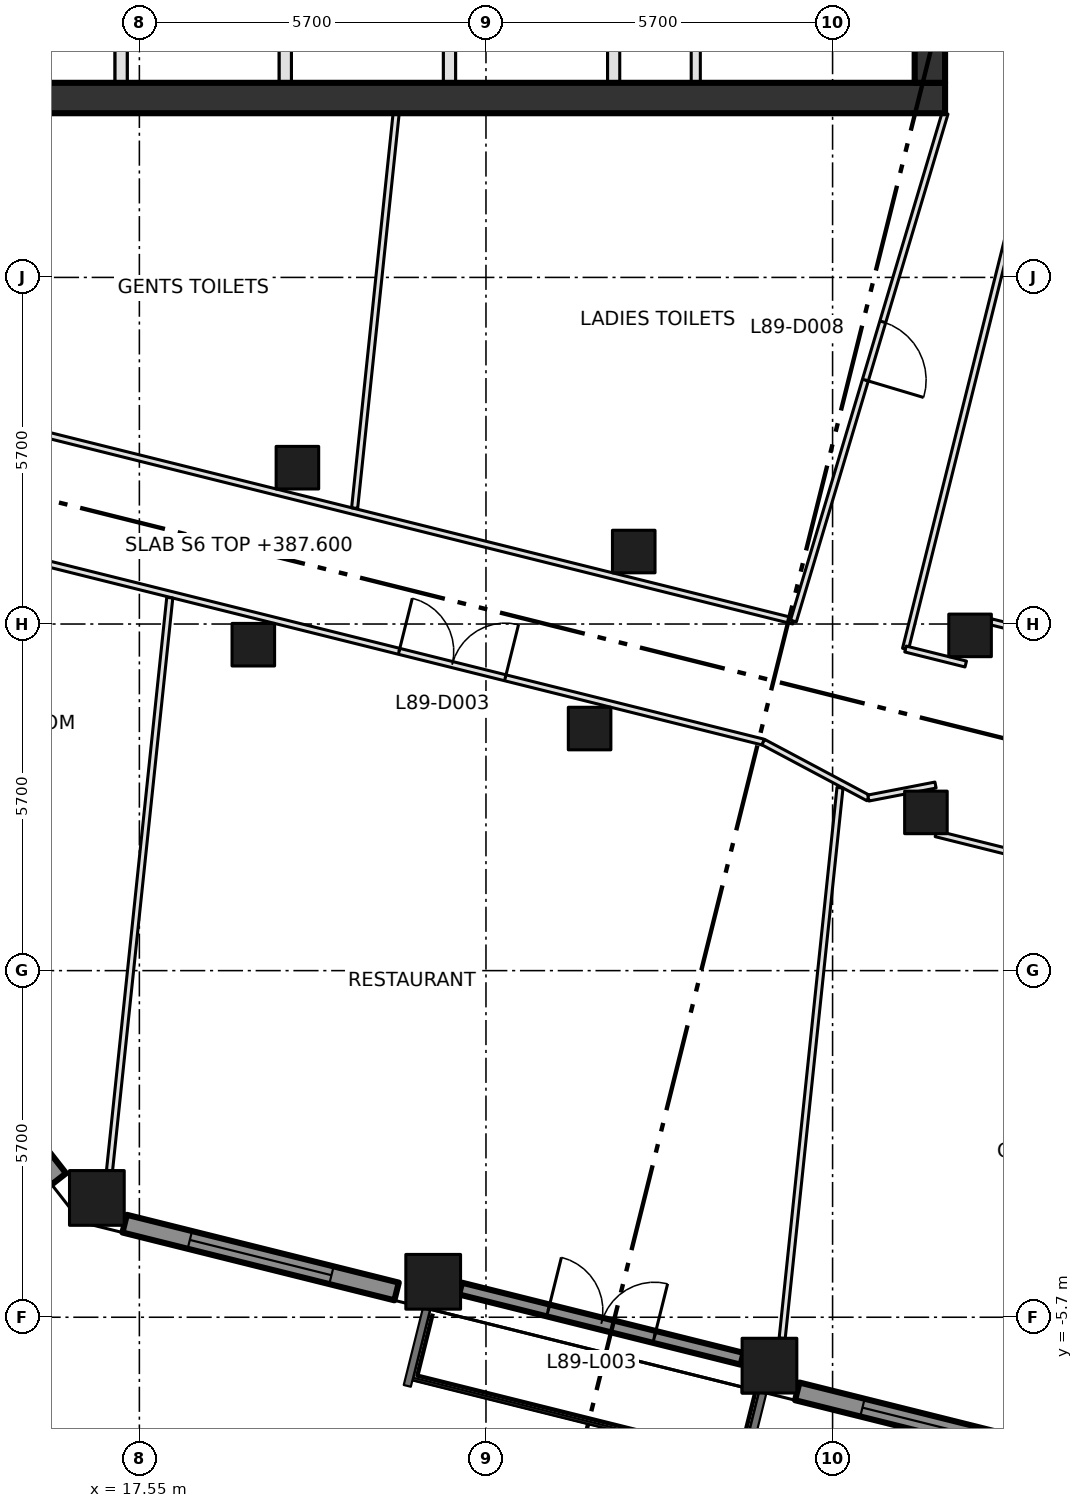
"""IFC4 building model, lengths in metres.
Left out: names, types, materials, properties, quantities, classifications, styles, units other than length and angle.
Written with IfcOpenShell. Run it as: python <this file> out.ifc"""

import sys

from ifc_helpers import new_model, si_unit, direction, frame, frame_2d, origin, origin_2d, place, context, subcontext, project, spatial, rectangle, extrude, element, fill, save


model = new_model("IFC4")
c1 = context("Model", 3, precision=1e-05, world=origin(), true_north=direction((0.0, 1.0)))
c2 = subcontext(c1, "Body", "Model", "MODEL_VIEW")
j1 = project(units=[si_unit("LENGTHUNIT", "METRE"), si_unit("PLANEANGLEUNIT", "RADIAN")], contexts=[c1])
p1 = place(None, origin())
s1 = spatial("IfcSite", under=j1, at=p1, CompositionType="ELEMENT")
p2 = place(p1, origin())
s2 = spatial("IfcBuilding", under=s1, at=p2, CompositionType="ELEMENT")
p3 = place(p2, frame((0.0, 0.0, 387.6)))
s3 = spatial("IfcBuildingStorey", under=s2, at=p3, CompositionType="ELEMENT", Elevation=387.6)
for number, where, z_axis, x_axis in (
    (1, (16.851, -3.738, 0.0), (0.0, 0.0, 1.0), (1.0, 0.0, 0.0)),
    (2, (22.382, -5.117, 0.0), (0.0, 0.0, 1.0), (1.0, 0.0, 0.0)),
    (3, (27.912, -6.496, 0.0), (0.0, 0.0, 1.0), (1.0, 0.0, 0.0)),
):
    element("IfcColumn", number, at=place(p3, frame(where, z_axis=z_axis, x_axis=x_axis)), inside=s3, PredefinedType="COLUMN", context=c2, shape_type="SweptSolid", body=[
        extrude(rectangle(XDim=0.9, YDim=0.9, at=origin_2d()), origin(), (0.0, 0.0, 1.0), 4.2),
    ])
for number, where, z_axis, x_axis in (
    (4, (19.424, 5.36, 0.0), (0.0, 0.0, 1.0), (1.0, 0.0, 0.0)),
    (5, (24.954, 3.981, 0.0), (0.0, 0.0, 1.0), (1.0, 0.0, 0.0)),
    (6, (30.485, 2.602, 0.0), (0.0, 0.0, 1.0), (1.0, 0.0, 0.0)),
    (7, (20.149, 8.271, 0.0), (0.0, 0.0, 1.0), (1.0, 0.0, 0.0)),
    (8, (25.68, 6.892, 0.0), (0.0, 0.0, 1.0), (1.0, 0.0, 0.0)),
    (9, (31.211, 5.513, 0.0), (0.0, 0.0, 1.0), (1.0, 0.0, 0.0)),
):
    element("IfcColumn", number, at=place(p3, frame(where, z_axis=z_axis, x_axis=x_axis)), inside=s3, PredefinedType="COLUMN", context=c2, shape_type="SweptSolid", body=[
        extrude(rectangle(XDim=0.7, YDim=0.7, at=origin_2d()), origin(), (0.0, 0.0, 1.0), 4.2),
    ])
p4 = place(p3, frame((8.0, 14.35, -0.3), z_axis=(0.0, 0.0, 1.0), x_axis=(1.0, 0.0, 0.0)))
e10 = element("IfcWall", 10, at=p4, inside=s3, PredefinedType="SHEAR", context=c2, shape_type="SweptSolid", body=[
    extrude(rectangle(XDim=22.8, YDim=0.5, at=frame_2d((11.4, 0.0))), origin(), (0.0, 0.0, 1.0), 4.2),
])
p5 = place(p4, frame((2.3, 0.0, 0.3)))
e11 = element("IfcOpeningElement", 11, at=p5, cuts=e10, PredefinedType="OPENING", context=c2, shape_type="SweptSolid", body=[
    extrude(rectangle(XDim=1.8, YDim=2.1, at=frame_2d((0.9, 1.05))), frame((0.0, 0.26, 0.0), z_axis=(0.0, -1.0, 0.0), x_axis=(1.0, 0.0, 0.0)), (0.0, 0.0, 1.0), 0.52),
])
p6 = place(p3, frame((30.55, 14.6, -0.3), z_axis=(0.0, 0.0, 1.0), x_axis=(0.0, 1.0, 0.0)))
e12 = element("IfcWall", 12, at=p6, inside=s3, PredefinedType="SHEAR", context=c2, shape_type="SweptSolid", body=[
    extrude(rectangle(XDim=21.1, YDim=0.5, at=frame_2d((10.55, 0.0))), origin(), (0.0, 0.0, 1.0), 4.2),
])
for number, where, z_axis, x_axis in (
    (13, (17.25, 14.6, 0.0), (0.0, 0.0, 1.0), (0.0, 1.0, 0.0)),
    (14, (19.95, 14.6, 0.0), (0.0, 0.0, 1.0), (0.0, 1.0, 0.0)),
    (15, (22.65, 14.6, 0.0), (0.0, 0.0, 1.0), (0.0, 1.0, 0.0)),
    (16, (25.35, 14.6, 0.0), (0.0, 0.0, 1.0), (0.0, 1.0, 0.0)),
):
    element("IfcWall", number, at=place(p3, frame(where, z_axis=z_axis, x_axis=x_axis)), inside=s3, PredefinedType="SOLIDWALL", context=c2, shape_type="SweptSolid", body=[
        extrude(rectangle(XDim=3.0, YDim=0.2, at=frame_2d((1.5, 0.0))), origin(), (0.0, 0.0, 1.0), 3.9),
    ])
p7 = place(p3, frame((26.7, 14.6, 0.0), z_axis=(0.0, 0.0, 1.0), x_axis=(0.0, 1.0, 0.0)))
e17 = element("IfcWall", 17, at=p7, inside=s3, PredefinedType="PARTITIONING", context=c2, shape_type="SweptSolid", body=[
    extrude(rectangle(XDim=3.0, YDim=0.15, at=frame_2d((1.5, 0.0))), origin(), (0.0, 0.0, 1.0), 3.9),
])
p8 = place(p3, frame((13.494, 0.071, 0.0), z_axis=(0.0, 0.0, 1.0), x_axis=(0.615763624226, -0.787930935476, 0.0)))
e18 = element("IfcWall", 18, at=p8, inside=s3, PredefinedType="SOLIDWALL", context=c2, shape_type="SweptSolid", body=[
    extrude(rectangle(XDim=4.437, YDim=0.3, at=frame_2d((2.219, 0.0))), origin(), (0.0, 0.0, 1.0), 3.2),
])
p9 = place(p8, frame((1.018, 0.0, 0.8)))
e19 = element("IfcOpeningElement", 19, at=p9, cuts=e18, PredefinedType="OPENING", context=c2, shape_type="SweptSolid", body=[
    extrude(rectangle(XDim=2.4, YDim=2.1, at=frame_2d((1.2, 1.05))), frame((0.0, 0.16, 0.0), z_axis=(0.0, -1.0, 0.0), x_axis=(1.0, 0.0, 0.0)), (0.0, 0.0, 1.0), 0.32),
])
p10 = place(p3, frame((17.308, -4.161, 0.0), z_axis=(0.0, 0.0, 1.0), x_axis=(0.970294992984, -0.241924836652, 0.0)))
e20 = element("IfcWall", 20, at=p10, inside=s3, PredefinedType="SOLIDWALL", context=c2, shape_type="SweptSolid", body=[
    extrude(rectangle(XDim=4.609, YDim=0.3, at=frame_2d((2.304, 0.0))), origin(), (0.0, 0.0, 1.0), 3.2),
])
p11 = place(p10, frame((1.105, 0.0, 0.8)))
e21 = element("IfcOpeningElement", 21, at=p11, cuts=e20, PredefinedType="OPENING", context=c2, shape_type="SweptSolid", body=[
    extrude(rectangle(XDim=2.4, YDim=2.1, at=frame_2d((1.2, 1.05))), frame((0.0, 0.16, 0.0), z_axis=(0.0, -1.0, 0.0), x_axis=(1.0, 0.0, 0.0)), (0.0, 0.0, 1.0), 0.32),
])
p12 = place(p3, frame((22.832, -5.229, 0.0), z_axis=(0.0, 0.0, 1.0), x_axis=(0.9703108125, -0.241861380019, 0.0)))
e22 = element("IfcWall", 22, at=p12, inside=s3, PredefinedType="SOLIDWALL", context=c2, shape_type="SweptSolid", body=[
    extrude(rectangle(XDim=4.771, YDim=0.2, at=frame_2d((2.386, 0.0))), origin(), (0.0, 0.0, 1.0), 3.2),
])
p13 = place(p12, frame((1.485, 0.0, 0.0)))
e23 = element("IfcOpeningElement", 23, at=p13, cuts=e22, PredefinedType="OPENING", context=c2, shape_type="SweptSolid", body=[
    extrude(rectangle(XDim=1.8, YDim=2.9, at=frame_2d((0.9, 1.45))), frame((0.0, 0.11, 0.0), z_axis=(0.0, -1.0, 0.0), x_axis=(1.0, 0.0, 0.0)), (0.0, 0.0, 1.0), 0.22),
])
p14 = place(p3, frame((22.225, -6.448, 0.0), z_axis=(0.0, 0.0, 1.0), x_axis=(0.970268314528, -0.242031811592, 0.0)))
e24 = element("IfcWall", 24, at=p14, inside=s3, PredefinedType="SOLIDWALL", context=c2, shape_type="SweptSolid", body=[
    extrude(rectangle(XDim=5.359, YDim=0.4, at=frame_2d((2.68, 0.0))), origin(), (0.0, 0.0, 1.0), 0.3),
])
p15 = place(p3, frame((28.369, -6.919, 0.0), z_axis=(0.0, 0.0, 1.0), x_axis=(0.970298093093, -0.241912402618, 0.0)))
e25 = element("IfcWall", 25, at=p15, inside=s3, PredefinedType="SOLIDWALL", context=c2, shape_type="SweptSolid", body=[
    extrude(rectangle(XDim=4.609, YDim=0.3, at=frame_2d((2.305, 0.0))), origin(), (0.0, 0.0, 1.0), 3.2),
])
p16 = place(p15, frame((1.105, 0.0, 0.8)))
e26 = element("IfcOpeningElement", 26, at=p16, cuts=e25, PredefinedType="OPENING", context=c2, shape_type="SweptSolid", body=[
    extrude(rectangle(XDim=2.4, YDim=2.1, at=frame_2d((1.2, 1.05))), frame((0.0, 0.16, 0.0), z_axis=(0.0, -1.0, 0.0), x_axis=(1.0, 0.0, 0.0)), (0.0, 0.0, 1.0), 0.32),
])
p17 = place(p3, frame((8.521, 8.567, 0.0), z_axis=(0.0, 0.0, 1.0), x_axis=(0.970301223092, -0.241899848006, 0.0)))
e27 = element("IfcWall", 27, at=p17, inside=s3, PredefinedType="PARTITIONING", context=c2, shape_type="SweptSolid", body=[
    extrude(rectangle(XDim=19.879, YDim=0.1, at=frame_2d((9.94, 0.0))), origin(), (0.0, 0.0, 1.0), 3.9),
])
p18 = place(p17, frame((13.707, 0.0, 0.0)))
e28 = element("IfcOpeningElement", 28, at=p18, cuts=e27, PredefinedType="OPENING", context=c2, shape_type="SweptSolid", body=[
    extrude(rectangle(XDim=1.8, YDim=2.1, at=frame_2d((0.9, 1.05))), frame((0.0, 0.06, 0.0), z_axis=(0.0, -1.0, 0.0), x_axis=(1.0, 0.0, 0.0)), (0.0, 0.0, 1.0), 0.12),
])
p19 = place(p17, frame((4.18, 0.0, 0.0)))
e29 = element("IfcOpeningElement", 29, at=p19, cuts=e27, PredefinedType="OPENING", context=c2, shape_type="SweptSolid", body=[
    extrude(rectangle(XDim=1.0, YDim=2.1, at=frame_2d((0.5, 1.05))), frame((0.0, 0.06, 0.0), z_axis=(0.0, -1.0, 0.0), x_axis=(1.0, 0.0, 0.0)), (0.0, 0.0, 1.0), 0.12),
])
p20 = place(p3, frame((9.017, 10.558, 0.0), z_axis=(0.0, 0.0, 1.0), x_axis=(0.970297621765, -0.241914293082, 0.0)))
e30 = element("IfcWall", 30, at=p20, inside=s3, PredefinedType="PARTITIONING", context=c2, shape_type="SweptSolid", body=[
    extrude(rectangle(XDim=19.879, YDim=0.1, at=frame_2d((9.94, 0.0))), origin(), (0.0, 0.0, 1.0), 3.9),
])
p21 = place(p3, frame((27.81, 3.758, 0.0), z_axis=(0.0, 0.0, 1.0), x_axis=(0.882659984129, -0.470012076884, 0.0)))
e31 = element("IfcWall", 31, at=p21, inside=s3, PredefinedType="PARTITIONING", context=c2, shape_type="SweptSolid", body=[
    extrude(rectangle(XDim=1.958, YDim=0.1, at=frame_2d((0.979, 0.0))), origin(), (0.0, 0.0, 1.0), 3.9),
])
p22 = place(p3, frame((29.538, 2.838, 0.0), z_axis=(0.0, 0.0, 1.0), x_axis=(0.981739361474, 0.190230981001, 0.0)))
e32 = element("IfcWall", 32, at=p22, inside=s3, PredefinedType="PARTITIONING", context=c2, shape_type="SweptSolid", body=[
    extrude(rectangle(XDim=1.125, YDim=0.1, at=frame_2d((0.563, 0.0))), origin(), (0.0, 0.0, 1.0), 3.9),
])
p23 = place(p3, frame((30.149, 5.289, 0.0), z_axis=(0.0, 0.0, 1.0), x_axis=(0.241978995789, 0.970281487815, 0.0)))
e33 = element("IfcWall", 33, at=p23, inside=s3, PredefinedType="PARTITIONING", context=c2, shape_type="SweptSolid", body=[
    extrude(rectangle(XDim=8.05, YDim=0.1, at=frame_2d((4.025, 0.0))), origin(), (0.0, 0.0, 1.0), 3.9),
])
p24 = place(p3, frame((30.649, 2.252, 0.0), z_axis=(0.0, 0.0, 1.0), x_axis=(0.970292295429, -0.241935655561, 0.0)))
e34 = element("IfcWall", 34, at=p24, inside=s3, PredefinedType="PARTITIONING", context=c2, shape_type="SweptSolid", body=[
    extrude(rectangle(XDim=5.171, YDim=0.1, at=frame_2d((2.585, 0.0))), origin(), (0.0, 0.0, 1.0), 3.9),
])
p25 = place(p3, frame((30.8, 14.1, 0.0), z_axis=(0.0, 0.0, 1.0), x_axis=(-0.286170650389, -0.958178667502, 0.0)))
e35 = element("IfcWall", 35, at=p25, inside=s3, PredefinedType="PARTITIONING", context=c2, shape_type="SweptSolid", body=[
    extrude(rectangle(XDim=8.716, YDim=0.1, at=frame_2d((4.358, 0.0))), origin(), (0.0, 0.0, 1.0), 3.9),
])
p26 = place(p25, frame((3.58, 0.0, 0.0)))
e36 = element("IfcOpeningElement", 36, at=p26, cuts=e35, PredefinedType="OPENING", context=c2, shape_type="SweptSolid", body=[
    extrude(rectangle(XDim=1.0, YDim=2.1, at=frame_2d((0.5, 1.05))), frame((0.0, 0.06, 0.0), z_axis=(0.0, -1.0, 0.0), x_axis=(1.0, 0.0, 0.0)), (0.0, 0.0, 1.0), 0.12),
])
p27 = place(p3, frame((31.14, 5.042, 0.0), z_axis=(0.0, 0.0, 1.0), x_axis=(-0.970296981152, 0.24191686251, 0.0)))
e37 = element("IfcWall", 37, at=p27, inside=s3, PredefinedType="PARTITIONING", context=c2, shape_type="SweptSolid", body=[
    extrude(rectangle(XDim=1.021, YDim=0.1, at=frame_2d((0.511, 0.0))), origin(), (0.0, 0.0, 1.0), 3.9),
])
p28 = place(p3, frame((36.578, 4.484, 0.0), z_axis=(0.0, 0.0, 1.0), x_axis=(-0.97027844575, 0.241991193463, 0.0)))
e38 = element("IfcWall", 38, at=p28, inside=s3, PredefinedType="PARTITIONING", context=c2, shape_type="SweptSolid", body=[
    extrude(rectangle(XDim=5.17, YDim=0.1, at=frame_2d((2.585, 0.0))), origin(), (0.0, 0.0, 1.0), 3.9),
])
p29 = place(p28, frame((1.68, 0.0, 0.0)))
e39 = element("IfcOpeningElement", 39, at=p29, cuts=e38, PredefinedType="OPENING", context=c2, shape_type="SweptSolid", body=[
    extrude(rectangle(XDim=1.8, YDim=2.1, at=frame_2d((0.9, 1.05))), frame((0.0, 0.06, 0.0), z_axis=(0.0, -1.0, 0.0), x_axis=(1.0, 0.0, 0.0)), (0.0, 0.0, 1.0), 0.12),
])
p30 = place(p3, frame((17.059, -3.288, 0.0), z_axis=(0.0, 0.0, 1.0), x_axis=(0.104608315677, 0.994513499301, 0.0)))
e40 = element("IfcWall", 40, at=p30, inside=s3, PredefinedType="PARTITIONING", context=c2, shape_type="SweptSolid", body=[
    extrude(rectangle(XDim=9.473, YDim=0.1, at=frame_2d((4.737, 0.0))), origin(), (0.0, 0.0, 1.0), 3.9),
])
p31 = place(p3, frame((21.09, 7.606, 0.0), z_axis=(0.0, 0.0, 1.0), x_axis=(0.104573849471, 0.994517124039, 0.0)))
e41 = element("IfcWall", 41, at=p31, inside=s3, PredefinedType="PARTITIONING", context=c2, shape_type="SweptSolid", body=[
    extrude(rectangle(XDim=6.53, YDim=0.1, at=frame_2d((3.265, 0.0))), origin(), (0.0, 0.0, 1.0), 3.9),
])
p32 = place(p3, frame((28.121, -6.046, 0.0), z_axis=(0.0, 0.0, 1.0), x_axis=(0.104454444479, 0.994529672272, 0.0)))
e42 = element("IfcWall", 42, at=p32, inside=s3, PredefinedType="PARTITIONING", context=c2, shape_type="SweptSolid", body=[
    extrude(rectangle(XDim=9.104, YDim=0.1, at=frame_2d((4.552, 0.0))), origin(), (0.0, 0.0, 1.0), 3.9),
])
p33 = place(p11, origin())
e43 = element("IfcWindow", 43, at=p33, inside=s3, PartitioningType="DOUBLE_PANEL_VERTICAL", PredefinedType="WINDOW", context=c2, shape_type="SweptSolid", body=[
    extrude(rectangle(XDim=2.4, YDim=2.1, at=frame_2d((1.2, 1.05))), frame((0.0, 0.03, 0.0), z_axis=(0.0, -1.0, 0.0), x_axis=(1.0, 0.0, 0.0)), (0.0, 0.0, 1.0), 0.06),
])
fill(e21, e43)
p34 = place(p13, origin())
e44 = element("IfcDoor", 44, at=p34, inside=s3, OperationType="DOUBLE_DOOR_SINGLE_SWING", PredefinedType="DOOR", context=c2, shape_type="SweptSolid", body=[
    extrude(rectangle(XDim=1.8, YDim=2.9, at=frame_2d((0.9, 1.45))), frame((0.0, 0.025, 0.0), z_axis=(0.0, -1.0, 0.0), x_axis=(1.0, 0.0, 0.0)), (0.0, 0.0, 1.0), 0.05),
])
fill(e23, e44)
p35 = place(p16, origin())
e45 = element("IfcWindow", 45, at=p35, inside=s3, PartitioningType="DOUBLE_PANEL_VERTICAL", PredefinedType="WINDOW", context=c2, shape_type="SweptSolid", body=[
    extrude(rectangle(XDim=2.4, YDim=2.1, at=frame_2d((1.2, 1.05))), frame((0.0, 0.03, 0.0), z_axis=(0.0, -1.0, 0.0), x_axis=(1.0, 0.0, 0.0)), (0.0, 0.0, 1.0), 0.06),
])
fill(e26, e45)
p36 = place(p18, origin())
e46 = element("IfcDoor", 46, at=p36, inside=s3, OperationType="DOUBLE_DOOR_SINGLE_SWING", PredefinedType="DOOR", context=c2, shape_type="SweptSolid", body=[
    extrude(rectangle(XDim=1.8, YDim=2.1, at=frame_2d((0.9, 1.05))), frame((0.0, 0.025, 0.0), z_axis=(0.0, -1.0, 0.0), x_axis=(1.0, 0.0, 0.0)), (0.0, 0.0, 1.0), 0.05),
])
fill(e28, e46)
p37 = place(p26, origin())
e47 = element("IfcDoor", 47, at=p37, inside=s3, OperationType="SINGLE_SWING_RIGHT", PredefinedType="DOOR", context=c2, shape_type="SweptSolid", body=[
    extrude(rectangle(XDim=1.0, YDim=2.1, at=frame_2d((0.5, 1.05))), frame((0.0, 0.025, 0.0), z_axis=(0.0, -1.0, 0.0), x_axis=(1.0, 0.0, 0.0)), (0.0, 0.0, 1.0), 0.05),
])
fill(e36, e47)
save(model, sys.argv[1])
